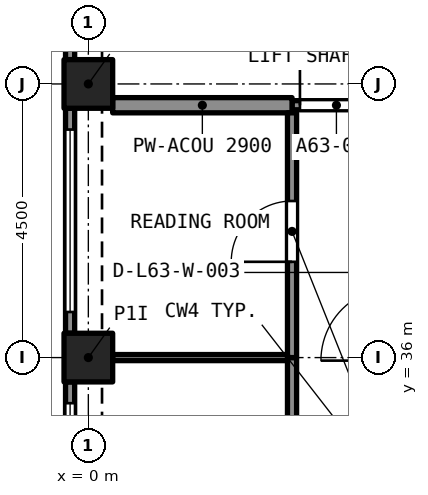
"""IFC4 building model, lengths in metres.
Left out: names, types, materials, properties, quantities, classifications, styles, units other than length and angle.
Written with IfcOpenShell. Run it as: python <this file> out.ifc"""

import sys

from ifc_helpers import new_model, si_unit, direction, frame, frame_2d, origin, origin_2d, place, context, subcontext, project, spatial, rectangle, extrude, element, fill, save


model = new_model("IFC4")
c1 = context("Model", 3, precision=1e-05, world=origin(), true_north=direction((0.0, 1.0)))
c2 = subcontext(c1, "Body", "Model", "MODEL_VIEW")
j1 = project(units=[si_unit("LENGTHUNIT", "METRE"), si_unit("PLANEANGLEUNIT", "RADIAN")], contexts=[c1])
p1 = place(None, origin())
s1 = spatial("IfcSite", under=j1, at=p1, CompositionType="ELEMENT")
p2 = place(p1, origin())
s2 = spatial("IfcBuilding", under=s1, at=p2, CompositionType="ELEMENT")
p3 = place(p2, frame((0.0, 0.0, 226.095)))
s3 = spatial("IfcBuildingStorey", under=s2, at=p3, CompositionType="ELEMENT", Elevation=226.095)
for number, where, z_axis, x_axis in (
    (1, (0.0, 36.0, 0.0), (0.0, 0.0, 1.0), (1.0, 0.0, 0.0)),
    (2, (0.0, 40.5, 0.0), (0.0, 0.0, 1.0), (1.0, 0.0, 0.0)),
):
    element("IfcColumn", number, at=place(p3, frame(where, z_axis=z_axis, x_axis=x_axis)), inside=s3, PredefinedType="COLUMN", context=c2, shape_type="SweptSolid", body=[
        extrude(rectangle(XDim=0.8, YDim=0.8, at=origin_2d()), origin(), (0.0, 0.0, 1.0), 3.2),
    ])
p4 = place(p3, frame((-0.3, 40.9, 0.0), z_axis=(0.0, 0.0, 1.0), x_axis=(0.0, 1.0, 0.0)))
e3 = element("IfcWall", 3, at=p4, inside=s3, PredefinedType="SOLIDWALL", context=c2, shape_type="SweptSolid", body=[
    extrude(rectangle(XDim=3.7, YDim=0.15, at=frame_2d((1.85, 0.0))), origin(), (0.0, 0.0, 1.0), 3.2),
])
p5 = place(p4, frame((0.35, 0.0, 0.45)))
e4 = element("IfcOpeningElement", 4, at=p5, cuts=e3, PredefinedType="OPENING", context=c2, shape_type="SweptSolid", body=[
    extrude(rectangle(XDim=3.0, YDim=1.95, at=frame_2d((1.5, 0.975))), frame((0.0, 0.085, 0.0), z_axis=(0.0, -1.0, 0.0), x_axis=(1.0, 0.0, 0.0)), (0.0, 0.0, 1.0), 0.17),
])
p6 = place(p3, frame((-0.3, 36.4, 0.0), z_axis=(0.0, 0.0, 1.0), x_axis=(0.0, 1.0, 0.0)))
e5 = element("IfcWall", 5, at=p6, inside=s3, PredefinedType="SOLIDWALL", context=c2, shape_type="SweptSolid", body=[
    extrude(rectangle(XDim=3.7, YDim=0.15, at=frame_2d((1.85, 0.0))), origin(), (0.0, 0.0, 1.0), 3.2),
])
p7 = place(p6, frame((0.35, 0.0, 0.45)))
e6 = element("IfcOpeningElement", 6, at=p7, cuts=e5, PredefinedType="OPENING", context=c2, shape_type="SweptSolid", body=[
    extrude(rectangle(XDim=3.0, YDim=1.95, at=frame_2d((1.5, 0.975))), frame((0.0, 0.085, 0.0), z_axis=(0.0, -1.0, 0.0), x_axis=(1.0, 0.0, 0.0)), (0.0, 0.0, 1.0), 0.17),
])
p8 = place(p3, frame((-0.3, 31.9, 0.0), z_axis=(0.0, 0.0, 1.0), x_axis=(0.0, 1.0, 0.0)))
e7 = element("IfcWall", 7, at=p8, inside=s3, PredefinedType="SOLIDWALL", context=c2, shape_type="SweptSolid", body=[
    extrude(rectangle(XDim=3.7, YDim=0.15, at=frame_2d((1.85, 0.0))), origin(), (0.0, 0.0, 1.0), 3.2),
])
p9 = place(p8, frame((0.35, 0.0, 0.45)))
e8 = element("IfcOpeningElement", 8, at=p9, cuts=e7, PredefinedType="OPENING", context=c2, shape_type="SweptSolid", body=[
    extrude(rectangle(XDim=3.0, YDim=1.95, at=frame_2d((1.5, 0.975))), frame((0.0, 0.085, 0.0), z_axis=(0.0, -1.0, 0.0), x_axis=(1.0, 0.0, 0.0)), (0.0, 0.0, 1.0), 0.17),
])
p10 = place(p3, frame((3.35, 40.15, 0.0), z_axis=(0.0, 0.0, 1.0), x_axis=(1.0, 0.0, 0.0)))
e9 = element("IfcWall", 9, at=p10, inside=s3, PredefinedType="PARTITIONING", context=c2, shape_type="SweptSolid", body=[
    extrude(rectangle(XDim=1.5, YDim=0.15, at=frame_2d((0.75, 0.0))), origin(), (0.0, 0.0, 1.0), 2.9),
])
p11 = place(p10, frame((0.13, 0.0, 0.0)))
e10 = element("IfcOpeningElement", 10, at=p11, cuts=e9, PredefinedType="OPENING", context=c2, shape_type="SweptSolid", body=[
    extrude(rectangle(XDim=1.2, YDim=2.4, at=frame_2d((0.6, 1.2))), frame((0.0, 0.085, 0.0), z_axis=(0.0, -1.0, 0.0), x_axis=(1.0, 0.0, 0.0)), (0.0, 0.0, 1.0), 0.17),
])
p12 = place(p3, frame((0.4, 40.15, 0.0), z_axis=(0.0, 0.0, 1.0), x_axis=(1.0, 0.0, 0.0)))
e11 = element("IfcWall", 11, at=p12, inside=s3, PredefinedType="PARTITIONING", context=c2, shape_type="SweptSolid", body=[
    extrude(rectangle(XDim=2.95, YDim=0.25, at=frame_2d((1.475, 0.0))), origin(), (0.0, 0.0, 1.0), 2.9),
])
p13 = place(p3, frame((3.35, 31.5, 0.0), z_axis=(0.0, 0.0, 1.0), x_axis=(0.0, 1.0, 0.0)))
e12 = element("IfcWall", 12, at=p13, inside=s3, PredefinedType="PARTITIONING", context=c2, shape_type="SweptSolid", body=[
    extrude(rectangle(XDim=4.5, YDim=0.15, at=frame_2d((2.25, 0.0))), origin(), (0.0, 0.0, 1.0), 2.9),
])
p14 = place(p13, frame((1.75, 0.0, 0.0)))
e13 = element("IfcOpeningElement", 13, at=p14, cuts=e12, PredefinedType="OPENING", context=c2, shape_type="SweptSolid", body=[
    extrude(rectangle(XDim=1.0, YDim=2.1, at=frame_2d((0.5, 1.05))), frame((0.0, 0.085, 0.0), z_axis=(0.0, -1.0, 0.0), x_axis=(1.0, 0.0, 0.0)), (0.0, 0.0, 1.0), 0.17),
])
p15 = place(p3, frame((3.35, 36.0, 0.0), z_axis=(0.0, 0.0, 1.0), x_axis=(0.0, 1.0, 0.0)))
e14 = element("IfcWall", 14, at=p15, inside=s3, PredefinedType="PARTITIONING", context=c2, shape_type="SweptSolid", body=[
    extrude(rectangle(XDim=4.025, YDim=0.15, at=frame_2d((2.012, 0.0))), origin(), (0.0, 0.0, 1.0), 2.9),
])
p16 = place(p15, frame((1.575, 0.0, 0.0)))
e15 = element("IfcOpeningElement", 15, at=p16, cuts=e14, PredefinedType="OPENING", context=c2, shape_type="SweptSolid", body=[
    extrude(rectangle(XDim=1.0, YDim=2.1, at=frame_2d((0.5, 1.05))), frame((0.0, 0.085, 0.0), z_axis=(0.0, -1.0, 0.0), x_axis=(1.0, 0.0, 0.0)), (0.0, 0.0, 1.0), 0.17),
])
p17 = place(p3, frame((0.4, 36.0, 0.0), z_axis=(0.0, 0.0, 1.0), x_axis=(1.0, 0.0, 0.0)))
e16 = element("IfcWall", 16, at=p17, inside=s3, PredefinedType="PARTITIONING", context=c2, shape_type="SweptSolid", body=[
    extrude(rectangle(XDim=2.875, YDim=0.1, at=frame_2d((1.438, 0.0))), origin(), (0.0, 0.0, 1.0), 2.9),
])
p18 = place(p7, origin())
e17 = element("IfcWindow", 17, at=p18, inside=s3, PartitioningType="SINGLE_PANEL", PredefinedType="WINDOW", context=c2, shape_type="SweptSolid", body=[
    extrude(rectangle(XDim=3.0, YDim=1.95, at=frame_2d((1.5, 0.975))), frame((0.0, 0.03, 0.0), z_axis=(0.0, -1.0, 0.0), x_axis=(1.0, 0.0, 0.0)), (0.0, 0.0, 1.0), 0.06),
])
fill(e6, e17)
p19 = place(p9, origin())
e18 = element("IfcWindow", 18, at=p19, inside=s3, PartitioningType="SINGLE_PANEL", PredefinedType="WINDOW", context=c2, shape_type="SweptSolid", body=[
    extrude(rectangle(XDim=3.0, YDim=1.95, at=frame_2d((1.5, 0.975))), frame((0.0, 0.03, 0.0), z_axis=(0.0, -1.0, 0.0), x_axis=(1.0, 0.0, 0.0)), (0.0, 0.0, 1.0), 0.06),
])
fill(e8, e18)
p20 = place(p11, origin())
e19 = element("IfcDoor", 19, at=p20, inside=s3, OperationType="SINGLE_SWING_LEFT", PredefinedType="DOOR", context=c2, shape_type="SweptSolid", body=[
    extrude(rectangle(XDim=1.2, YDim=2.4, at=frame_2d((0.6, 1.2))), frame((0.0, 0.025, 0.0), z_axis=(0.0, -1.0, 0.0), x_axis=(1.0, 0.0, 0.0)), (0.0, 0.0, 1.0), 0.05),
])
fill(e10, e19)
p21 = place(p16, origin())
e20 = element("IfcDoor", 20, at=p21, inside=s3, OperationType="SINGLE_SWING_RIGHT", PredefinedType="DOOR", context=c2, shape_type="SweptSolid", body=[
    extrude(rectangle(XDim=1.0, YDim=2.1, at=frame_2d((0.5, 1.05))), frame((0.0, 0.025, 0.0), z_axis=(0.0, -1.0, 0.0), x_axis=(1.0, 0.0, 0.0)), (0.0, 0.0, 1.0), 0.05),
])
fill(e15, e20)
save(model, sys.argv[1])
